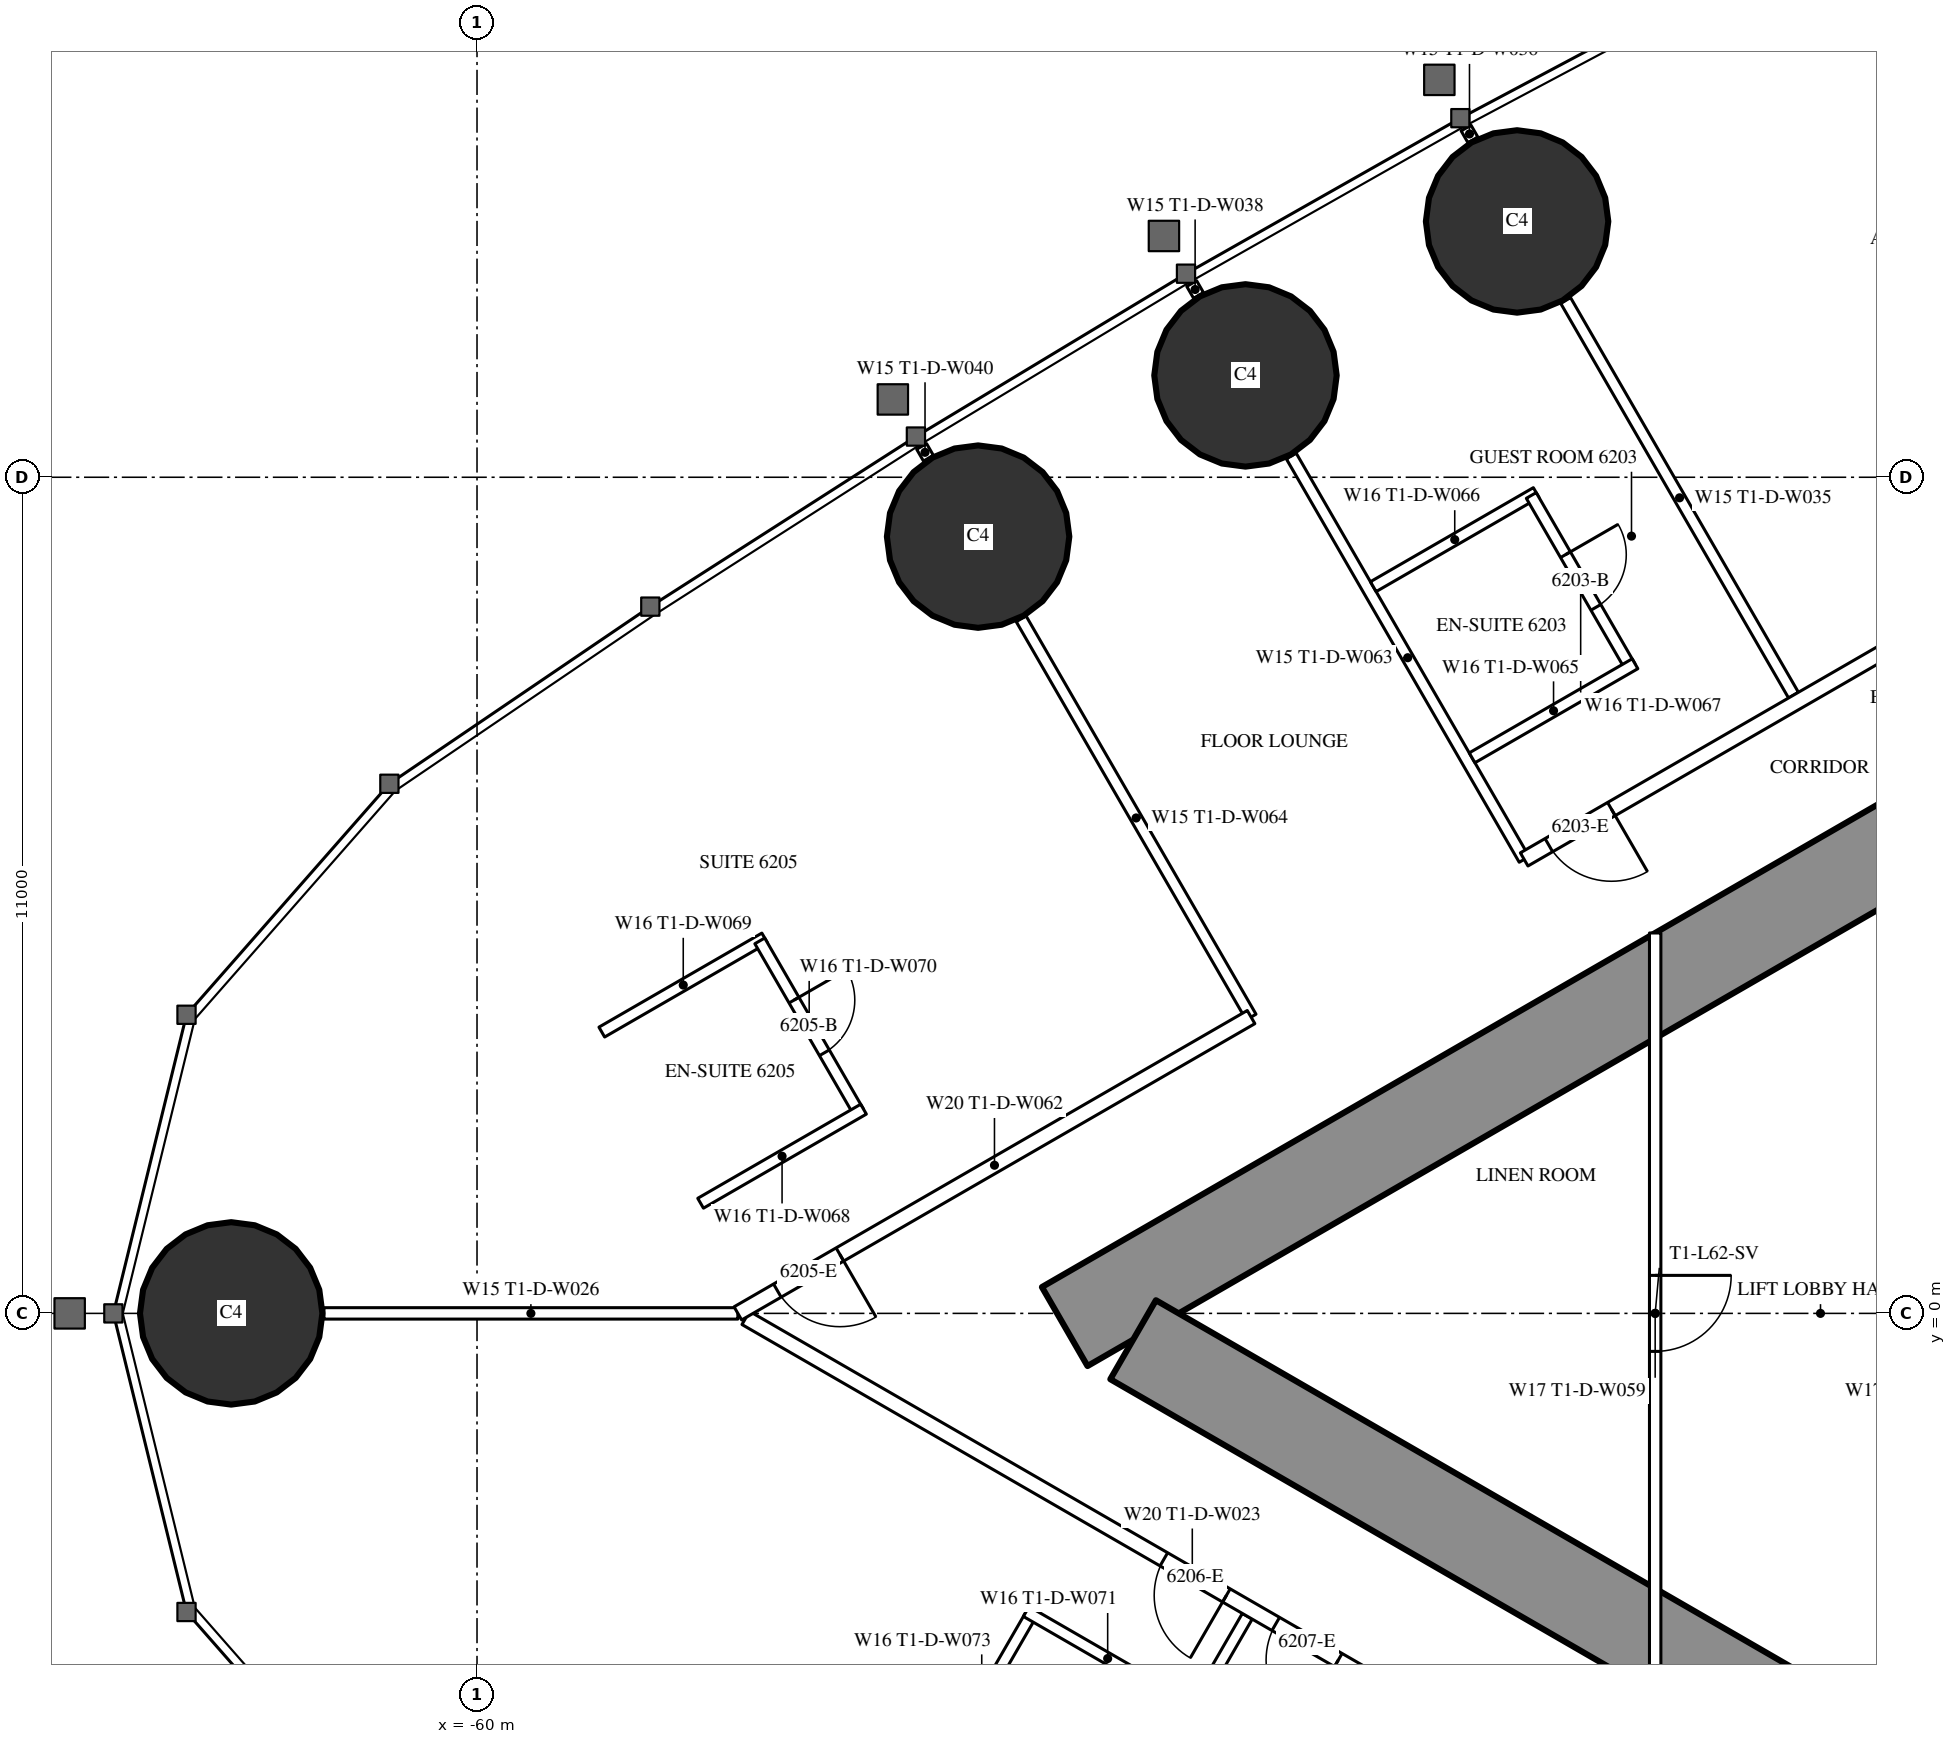
"""IFC4 building model, lengths in metres.
Left out: names, types, materials, properties, quantities, classifications, styles, units other than length and angle.
Written with IfcOpenShell. Run it as: python <this file> out.ifc"""

import sys

from ifc_helpers import new_model, si_unit, direction, frame, frame_2d, origin, origin_2d, place, context, subcontext, project, spatial, rectangle, circle, extrude, element, fill, save


model = new_model("IFC4")
c1 = context("Model", 3, precision=1e-05, world=origin(), true_north=direction((0.0, 1.0)))
c2 = subcontext(c1, "Body", "Model", "MODEL_VIEW")
j1 = project(units=[si_unit("LENGTHUNIT", "METRE"), si_unit("PLANEANGLEUNIT", "RADIAN")], contexts=[c1])
p1 = place(None, origin())
s1 = spatial("IfcSite", under=j1, at=p1, CompositionType="ELEMENT")
p2 = place(p1, origin())
s2 = spatial("IfcBuilding", under=s1, at=p2, CompositionType="ELEMENT")
p3 = place(p2, frame((0.0, 0.0, 233.3)))
s3 = spatial("IfcBuildingStorey", under=s2, at=p3, CompositionType="ELEMENT", Elevation=233.3)
for number, where, z_axis, x_axis in (
    (1, (-63.234, 0.0, 0.0), (0.0, 0.0, 1.0), (1.0, 0.0, 0.0)),
    (2, (-46.317, 14.365, 0.0), (0.0, 0.0, 1.0), (1.0, 0.0, 0.0)),
    (3, (-49.89, 12.34, 0.0), (0.0, 0.0, 1.0), (1.0, 0.0, 0.0)),
    (4, (-53.408, 10.219, 0.0), (0.0, 0.0, 1.0), (1.0, 0.0, 0.0)),
):
    element("IfcColumn", number, at=place(p3, frame(where, z_axis=z_axis, x_axis=x_axis)), inside=s3, PredefinedType="COLUMN", context=c2, shape_type="SweptSolid", body=[
        extrude(circle(Radius=1.2, at=origin_2d()), origin(), (0.0, 0.0, 1.0), 3.6),
    ])
p4 = place(p3, frame((-27.2, 14.3, 0.0), z_axis=(0.0, 0.0, 1.0), x_axis=(-0.866026593062, -0.499997940104, 0.0)))
e5 = element("IfcWall", 5, at=p4, inside=s3, PredefinedType="SHEAR", context=c2, shape_type="SweptSolid", body=[
    extrude(rectangle(XDim=28.946, YDim=1.2, at=frame_2d((14.473, 0.0))), origin(), (0.0, 0.0, 1.0), 3.6),
])
p5 = place(p4, frame((4.6, 0.0, 0.0)))
e6 = element("IfcOpeningElement", 6, at=p5, cuts=e5, PredefinedType="OPENING", context=c2, shape_type="SweptSolid", body=[
    extrude(rectangle(XDim=1.0, YDim=2.2, at=frame_2d((0.5, 1.1))), frame((0.0, 0.61, 0.0), z_axis=(0.0, -1.0, 0.0), x_axis=(1.0, 0.0, 0.0)), (0.0, 0.0, 1.0), 1.22),
])
p6 = place(p4, frame((13.395, 0.0, 0.0)))
e7 = element("IfcOpeningElement", 7, at=p6, cuts=e5, PredefinedType="OPENING", context=c2, shape_type="SweptSolid", body=[
    extrude(rectangle(XDim=1.8, YDim=2.2, at=frame_2d((0.9, 1.1))), frame((0.0, 0.61, 0.0), z_axis=(0.0, -1.0, 0.0), x_axis=(1.0, 0.0, 0.0)), (0.0, 0.0, 1.0), 1.22),
])
p7 = place(p3, frame((-27.2, -14.3, 0.0), z_axis=(0.0, 0.0, 1.0), x_axis=(-0.866024021859, 0.500002393557, 0.0)))
e8 = element("IfcWall", 8, at=p7, inside=s3, PredefinedType="SHEAR", context=c2, shape_type="SweptSolid", body=[
    extrude(rectangle(XDim=27.907, YDim=1.2, at=frame_2d((13.954, 0.0))), origin(), (0.0, 0.0, 1.0), 3.6),
])
p8 = place(p7, frame((4.6, 0.0, 0.0)))
e9 = element("IfcOpeningElement", 9, at=p8, cuts=e8, PredefinedType="OPENING", context=c2, shape_type="SweptSolid", body=[
    extrude(rectangle(XDim=1.0, YDim=2.2, at=frame_2d((0.5, 1.1))), frame((0.0, 0.61, 0.0), z_axis=(0.0, -1.0, 0.0), x_axis=(1.0, 0.0, 0.0)), (0.0, 0.0, 1.0), 1.22),
])
p9 = place(p7, frame((13.395, 0.0, 0.0)))
e10 = element("IfcOpeningElement", 10, at=p9, cuts=e8, PredefinedType="OPENING", context=c2, shape_type="SweptSolid", body=[
    extrude(rectangle(XDim=1.8, YDim=2.2, at=frame_2d((0.9, 1.1))), frame((0.0, 0.61, 0.0), z_axis=(0.0, -1.0, 0.0), x_axis=(1.0, 0.0, 0.0)), (0.0, 0.0, 1.0), 1.22),
])
p10 = place(p3, frame((-42.68, 8.134, 0.0), z_axis=(0.0, 0.0, 1.0), x_axis=(-0.499984479505, 0.866034364361, 0.0)))
e11 = element("IfcWall", 11, at=p10, inside=s3, PredefinedType="PARTITIONING", context=c2, shape_type="SweptSolid", body=[
    extrude(rectangle(XDim=5.995, YDim=0.15, at=frame_2d((2.998, 0.0))), origin(), (0.0, 0.0, 1.0), 2.45),
])
p11 = place(p3, frame((-46.898, 15.439, 0.0), z_axis=(0.0, 0.0, 1.0), x_axis=(-0.500232303069, 0.865891241997, 0.0)))
e12 = element("IfcWall", 12, at=p11, inside=s3, PredefinedType="PARTITIONING", context=c2, shape_type="SweptSolid", body=[
    extrude(rectangle(XDim=0.18, YDim=0.15, at=frame_2d((0.09, 0.0))), origin(), (0.0, 0.0, 1.0), 2.45),
])
p12 = place(p3, frame((-46.224, 5.972, 0.0), z_axis=(0.0, 0.0, 1.0), x_axis=(-0.500021351822, 0.866013075953, 0.0)))
e13 = element("IfcWall", 13, at=p12, inside=s3, PredefinedType="PARTITIONING", context=c2, shape_type="SweptSolid", body=[
    extrude(rectangle(XDim=6.128, YDim=0.15, at=frame_2d((3.064, 0.0))), origin(), (0.0, 0.0, 1.0), 2.45),
])
p13 = place(p3, frame((-50.508, 13.392, 0.0), z_axis=(0.0, 0.0, 1.0), x_axis=(-0.499644091975, 0.866230789891, 0.0)))
e14 = element("IfcWall", 14, at=p13, inside=s3, PredefinedType="PARTITIONING", context=c2, shape_type="SweptSolid", body=[
    extrude(rectangle(XDim=0.18, YDim=0.15, at=frame_2d((0.09, 0.0))), origin(), (0.0, 0.0, 1.0), 2.45),
])
p14 = place(p3, frame((-49.816, 3.898, 0.0), z_axis=(0.0, 0.0, 1.0), x_axis=(-0.500001913541, 0.866024298998, 0.0)))
e15 = element("IfcWall", 15, at=p14, inside=s3, PredefinedType="PARTITIONING", context=c2, shape_type="SweptSolid", body=[
    extrude(rectangle(XDim=6.05, YDim=0.15, at=frame_2d((3.025, 0.0))), origin(), (0.0, 0.0, 1.0), 2.45),
])
p15 = place(p3, frame((-54.061, 11.25, 0.0), z_axis=(0.0, 0.0, 1.0), x_axis=(-0.500391173478, 0.865799441849, 0.0)))
e16 = element("IfcWall", 16, at=p15, inside=s3, PredefinedType="PARTITIONING", context=c2, shape_type="SweptSolid", body=[
    extrude(rectangle(XDim=0.179, YDim=0.15, at=frame_2d((0.089, 0.0))), origin(), (0.0, 0.0, 1.0), 2.45),
])
p16 = place(p3, frame((-49.866, -3.985, 0.0), z_axis=(0.0, 0.0, 1.0), x_axis=(-0.500000694566, -0.866025002776, 0.0)))
e17 = element("IfcWall", 17, at=p16, inside=s3, PredefinedType="PARTITIONING", context=c2, shape_type="SweptSolid", body=[
    extrude(rectangle(XDim=5.95, YDim=0.15, at=frame_2d((2.975, 0.0))), origin(), (0.0, 0.0, 1.0), 2.45),
])
p17 = place(p3, frame((-56.568, 0.0, 0.0), z_axis=(0.0, 0.0, 1.0), x_axis=(-1.0, 0.0, 0.0)))
e18 = element("IfcWall", 18, at=p17, inside=s3, PredefinedType="PARTITIONING", context=c2, shape_type="SweptSolid", body=[
    extrude(rectangle(XDim=5.446, YDim=0.15, at=frame_2d((2.723, 0.0))), origin(), (0.0, 0.0, 1.0), 2.45),
])
p18 = place(p3, frame((-44.715, -6.844, 0.0), z_axis=(0.0, 0.0, 1.0), x_axis=(-0.866025261224, 0.500000246922, 0.0)))
e19 = element("IfcWall", 19, at=p18, inside=s3, PredefinedType="PARTITIONING", context=c2, shape_type="SweptSolid", body=[
    extrude(rectangle(XDim=13.567, YDim=0.2, at=frame_2d((6.783, 0.0))), origin(), (0.0, 0.0, 1.0), 3.35),
])
p19 = place(p18, frame((6.266, 0.0, 0.0)))
e20 = element("IfcOpeningElement", 20, at=p19, cuts=e19, PredefinedType="OPENING", context=c2, shape_type="SweptSolid", body=[
    extrude(rectangle(XDim=0.95, YDim=2.2, at=frame_2d((0.475, 1.1))), frame((0.0, 0.11, 0.0), z_axis=(0.0, -1.0, 0.0), x_axis=(1.0, 0.0, 0.0)), (0.0, 0.0, 1.0), 0.22),
])
p20 = place(p18, frame((4.565, 0.0, 0.0)))
e21 = element("IfcOpeningElement", 21, at=p20, cuts=e19, PredefinedType="OPENING", context=c2, shape_type="SweptSolid", body=[
    extrude(rectangle(XDim=0.95, YDim=2.2, at=frame_2d((0.475, 1.1))), frame((0.0, 0.11, 0.0), z_axis=(0.0, -1.0, 0.0), x_axis=(1.0, 0.0, 0.0)), (0.0, 0.0, 1.0), 0.22),
])
p21 = place(p18, frame((0.5, 0.0, 0.0)))
e22 = element("IfcOpeningElement", 22, at=p21, cuts=e19, PredefinedType="OPENING", context=c2, shape_type="SweptSolid", body=[
    extrude(rectangle(XDim=0.967, YDim=2.2, at=frame_2d((0.483, 1.1))), frame((0.0, 0.11, 0.0), z_axis=(0.0, -1.0, 0.0), x_axis=(1.0, 0.0, 0.0)), (0.0, 0.0, 1.0), 0.22),
])
p22 = place(p3, frame((-46.065, 10.798, 0.0), z_axis=(0.0, 0.0, 1.0), x_axis=(-0.866031185235, -0.4999899861, 0.0)))
e23 = element("IfcWall", 23, at=p22, inside=s3, PredefinedType="PARTITIONING", context=c2, shape_type="SweptSolid", body=[
    extrude(rectangle(XDim=2.475, YDim=0.15, at=frame_2d((1.238, 0.0))), origin(), (0.0, 0.0, 1.0), 3.35),
])
p23 = place(p3, frame((-44.83, 8.509, 0.0), z_axis=(0.0, 0.0, 1.0), x_axis=(-0.499936506574, 0.866062058628, 0.0)))
e24 = element("IfcWall", 24, at=p23, inside=s3, PredefinedType="PARTITIONING", context=c2, shape_type="SweptSolid", body=[
    extrude(rectangle(XDim=2.6, YDim=0.15, at=frame_2d((1.3, 0.0))), origin(), (0.0, 0.0, 1.0), 3.35),
])
p24 = place(p23, frame((0.9, 0.0, 0.0)))
e25 = element("IfcOpeningElement", 25, at=p24, cuts=e24, PredefinedType="OPENING", context=c2, shape_type="SweptSolid", body=[
    extrude(rectangle(XDim=0.8, YDim=2.2, at=frame_2d((0.4, 1.1))), frame((0.0, 0.085, 0.0), z_axis=(0.0, -1.0, 0.0), x_axis=(1.0, 0.0, 0.0)), (0.0, 0.0, 1.0), 0.17),
])
for number, where, z_axis, x_axis in (
    (26, (-44.765, 8.546, 0.0), (0.0, 0.0, 1.0), (-0.866, -0.5, 0.0)),
    (27, (-56.215, 4.938, 0.0), (0.0, 0.0, 1.0), (-0.866, -0.5, 0.0)),
):
    element("IfcWall", number, at=place(p3, frame(where, z_axis=z_axis, x_axis=x_axis)), inside=s3, PredefinedType="PARTITIONING", context=c2, shape_type="SweptSolid", body=[
        extrude(rectangle(XDim=2.475, YDim=0.15, at=frame_2d((1.237, 0.0))), origin(), (0.0, 0.0, 1.0), 3.35),
    ])
p25 = place(p3, frame((-54.98, 2.649, 0.0), z_axis=(0.0, 0.0, 1.0), x_axis=(-0.500006934395, 0.866021400173, 0.0)))
e28 = element("IfcWall", 28, at=p25, inside=s3, PredefinedType="PARTITIONING", context=c2, shape_type="SweptSolid", body=[
    extrude(rectangle(XDim=2.6, YDim=0.15, at=frame_2d((1.3, 0.0))), origin(), (0.0, 0.0, 1.0), 3.35),
])
p26 = place(p25, frame((0.9, 0.0, 0.0)))
e29 = element("IfcOpeningElement", 29, at=p26, cuts=e28, PredefinedType="OPENING", context=c2, shape_type="SweptSolid", body=[
    extrude(rectangle(XDim=0.8, YDim=2.2, at=frame_2d((0.4, 1.1))), frame((0.0, 0.085, 0.0), z_axis=(0.0, -1.0, 0.0), x_axis=(1.0, 0.0, 0.0)), (0.0, 0.0, 1.0), 0.17),
])
p27 = place(p3, frame((-54.915, 2.687, 0.0), z_axis=(0.0, 0.0, 1.0), x_axis=(-0.866006523861, -0.500032699561, 0.0)))
e30 = element("IfcWall", 30, at=p27, inside=s3, PredefinedType="PARTITIONING", context=c2, shape_type="SweptSolid", body=[
    extrude(rectangle(XDim=2.475, YDim=0.15, at=frame_2d((1.237, 0.0))), origin(), (0.0, 0.0, 1.0), 3.35),
])
p28 = place(p3, frame((-52.71, -3.96, 0.0), z_axis=(0.0, 0.0, 1.0), x_axis=(-0.500006934395, -0.866021400173, 0.0)))
e31 = element("IfcWall", 31, at=p28, inside=s3, PredefinedType="PARTITIONING", context=c2, shape_type="SweptSolid", body=[
    extrude(rectangle(XDim=2.6, YDim=0.15, at=frame_2d((1.3, 0.0))), origin(), (0.0, 0.0, 1.0), 3.35),
])
p29 = place(p28, frame((0.9, 0.0, 0.0)))
e32 = element("IfcOpeningElement", 32, at=p29, cuts=e31, PredefinedType="OPENING", context=c2, shape_type="SweptSolid", body=[
    extrude(rectangle(XDim=0.8, YDim=2.2, at=frame_2d((0.4, 1.1))), frame((0.0, 0.085, 0.0), z_axis=(0.0, -1.0, 0.0), x_axis=(1.0, 0.0, 0.0)), (0.0, 0.0, 1.0), 0.17),
])
p30 = place(p3, frame((-50.631, -5.16, 0.0), z_axis=(0.0, 0.0, 1.0), x_axis=(-0.86604923931, 0.499958713387, 0.0)))
e33 = element("IfcWall", 33, at=p30, inside=s3, PredefinedType="PARTITIONING", context=c2, shape_type="SweptSolid", body=[
    extrude(rectangle(XDim=2.475, YDim=0.15, at=frame_2d((1.237, 0.0))), origin(), (0.0, 0.0, 1.0), 2.5),
])
p31 = place(p3, frame((-28.737, 16.068, 0.0), z_axis=(0.0, 0.0, 1.0), x_axis=(-0.866023901326, -0.500002602325, 0.0)))
e34 = element("IfcWall", 34, at=p31, inside=s3, PredefinedType="PARTITIONING", context=c2, shape_type="SweptSolid", body=[
    extrude(rectangle(XDim=20.192, YDim=0.2, at=frame_2d((10.096, 0.0))), origin(), (0.0, 0.0, 1.0), 3.35),
])
p32 = place(p31, frame((1.08, 0.0, 0.0)))
e35 = element("IfcOpeningElement", 35, at=p32, cuts=e34, PredefinedType="OPENING", context=c2, shape_type="SweptSolid", body=[
    extrude(rectangle(XDim=1.8, YDim=2.03, at=frame_2d((0.9, 1.015))), frame((0.0, 0.11, 0.0), z_axis=(0.0, -1.0, 0.0), x_axis=(1.0, 0.0, 0.0)), (0.0, 0.0, 1.0), 0.22),
])
p33 = place(p31, frame((6.86, 0.0, 0.0)))
e36 = element("IfcOpeningElement", 36, at=p33, cuts=e34, PredefinedType="OPENING", context=c2, shape_type="SweptSolid", body=[
    extrude(rectangle(XDim=1.0, YDim=2.2, at=frame_2d((0.5, 1.1))), frame((0.0, 0.11, 0.0), z_axis=(0.0, -1.0, 0.0), x_axis=(1.0, 0.0, 0.0)), (0.0, 0.0, 1.0), 0.22),
])
p34 = place(p31, frame((18.867, 0.0, 0.0)))
e37 = element("IfcOpeningElement", 37, at=p34, cuts=e34, PredefinedType="OPENING", context=c2, shape_type="SweptSolid", body=[
    extrude(rectangle(XDim=0.95, YDim=2.2, at=frame_2d((0.475, 1.1))), frame((0.0, 0.11, 0.0), z_axis=(0.0, -1.0, 0.0), x_axis=(1.0, 0.0, 0.0)), (0.0, 0.0, 1.0), 0.22),
])
p35 = place(p3, frame((-49.816, 3.898, 0.0), z_axis=(0.0, 0.0, 1.0), x_axis=(-0.866028102716, -0.499995325284, 0.0)))
e38 = element("IfcWall", 38, at=p35, inside=s3, PredefinedType="PARTITIONING", context=c2, shape_type="SweptSolid", body=[
    extrude(rectangle(XDim=7.796, YDim=0.2, at=frame_2d((3.898, 0.0))), origin(), (0.0, 0.0, 1.0), 3.35),
])
p36 = place(p35, frame((6.246, 0.0, 0.0)))
e39 = element("IfcOpeningElement", 39, at=p36, cuts=e38, PredefinedType="OPENING", context=c2, shape_type="SweptSolid", body=[
    extrude(rectangle(XDim=0.95, YDim=2.2, at=frame_2d((0.475, 1.1))), frame((0.0, 0.11, 0.0), z_axis=(0.0, -1.0, 0.0), x_axis=(1.0, 0.0, 0.0)), (0.0, 0.0, 1.0), 0.22),
])
p37 = place(p3, frame((-44.5, 5.005, 0.0), z_axis=(0.0, 0.0, 1.0), x_axis=(0.0, -1.0, 0.0)))
e40 = element("IfcWall", 40, at=p37, inside=s3, PredefinedType="PARTITIONING", context=c2, shape_type="SweptSolid", body=[
    extrude(rectangle(XDim=10.009, YDim=0.15, at=frame_2d((5.005, 0.0))), origin(), (0.0, 0.0, 1.0), 2.5),
])
p38 = place(p37, frame((4.505, 0.0, 0.0)))
e41 = element("IfcOpeningElement", 41, at=p38, cuts=e40, PredefinedType="OPENING", context=c2, shape_type="SweptSolid", body=[
    extrude(rectangle(XDim=1.0, YDim=2.2, at=frame_2d((0.5, 1.1))), frame((0.0, 0.085, 0.0), z_axis=(0.0, -1.0, 0.0), x_axis=(1.0, 0.0, 0.0)), (0.0, 0.0, 1.0), 0.17),
])
p39 = place(p24, origin())
e42 = element("IfcDoor", 42, at=p39, inside=s3, OperationType="SINGLE_SWING_RIGHT", PredefinedType="DOOR", context=c2, shape_type="SweptSolid", body=[
    extrude(rectangle(XDim=0.8, YDim=2.2, at=frame_2d((0.4, 1.1))), frame((0.0, 0.025, 0.0), z_axis=(0.0, -1.0, 0.0), x_axis=(1.0, 0.0, 0.0)), (0.0, 0.0, 1.0), 0.05),
])
fill(e25, e42)
p40 = place(p34, origin())
e43 = element("IfcDoor", 43, at=p40, inside=s3, OperationType="SINGLE_SWING_LEFT", PredefinedType="DOOR", context=c2, shape_type="SweptSolid", body=[
    extrude(rectangle(XDim=0.95, YDim=2.2, at=frame_2d((0.475, 1.1))), frame((0.0, 0.025, 0.0), z_axis=(0.0, -1.0, 0.0), x_axis=(1.0, 0.0, 0.0)), (0.0, 0.0, 1.0), 0.05),
])
fill(e37, e43)
p41 = place(p26, origin())
e44 = element("IfcDoor", 44, at=p41, inside=s3, OperationType="SINGLE_SWING_RIGHT", PredefinedType="DOOR", context=c2, shape_type="SweptSolid", body=[
    extrude(rectangle(XDim=0.8, YDim=2.2, at=frame_2d((0.4, 1.1))), frame((0.0, 0.025, 0.0), z_axis=(0.0, -1.0, 0.0), x_axis=(1.0, 0.0, 0.0)), (0.0, 0.0, 1.0), 0.05),
])
fill(e29, e44)
p42 = place(p36, origin())
e45 = element("IfcDoor", 45, at=p42, inside=s3, OperationType="SINGLE_SWING_LEFT", PredefinedType="DOOR", context=c2, shape_type="SweptSolid", body=[
    extrude(rectangle(XDim=0.95, YDim=2.2, at=frame_2d((0.475, 1.1))), frame((0.0, 0.025, 0.0), z_axis=(0.0, -1.0, 0.0), x_axis=(1.0, 0.0, 0.0)), (0.0, 0.0, 1.0), 0.05),
])
fill(e39, e45)
p43 = place(p19, origin())
e46 = element("IfcDoor", 46, at=p43, inside=s3, OperationType="SINGLE_SWING_LEFT", PredefinedType="DOOR", context=c2, shape_type="SweptSolid", body=[
    extrude(rectangle(XDim=0.95, YDim=2.2, at=frame_2d((0.475, 1.1))), frame((0.0, 0.025, 0.0), z_axis=(0.0, -1.0, 0.0), x_axis=(1.0, 0.0, 0.0)), (0.0, 0.0, 1.0), 0.05),
])
fill(e20, e46)
p44 = place(p20, origin())
e47 = element("IfcDoor", 47, at=p44, inside=s3, OperationType="SINGLE_SWING_LEFT", PredefinedType="DOOR", context=c2, shape_type="SweptSolid", body=[
    extrude(rectangle(XDim=0.95, YDim=2.2, at=frame_2d((0.475, 1.1))), frame((0.0, 0.025, 0.0), z_axis=(0.0, -1.0, 0.0), x_axis=(1.0, 0.0, 0.0)), (0.0, 0.0, 1.0), 0.05),
])
fill(e21, e47)
p45 = place(p38, origin())
e48 = element("IfcDoor", 48, at=p45, inside=s3, OperationType="SINGLE_SWING_LEFT", PredefinedType="DOOR", context=c2, shape_type="SweptSolid", body=[
    extrude(rectangle(XDim=1.0, YDim=2.2, at=frame_2d((0.5, 1.1))), frame((0.0, 0.025, 0.0), z_axis=(0.0, -1.0, 0.0), x_axis=(1.0, 0.0, 0.0)), (0.0, 0.0, 1.0), 0.05),
])
fill(e41, e48)
save(model, sys.argv[1])
